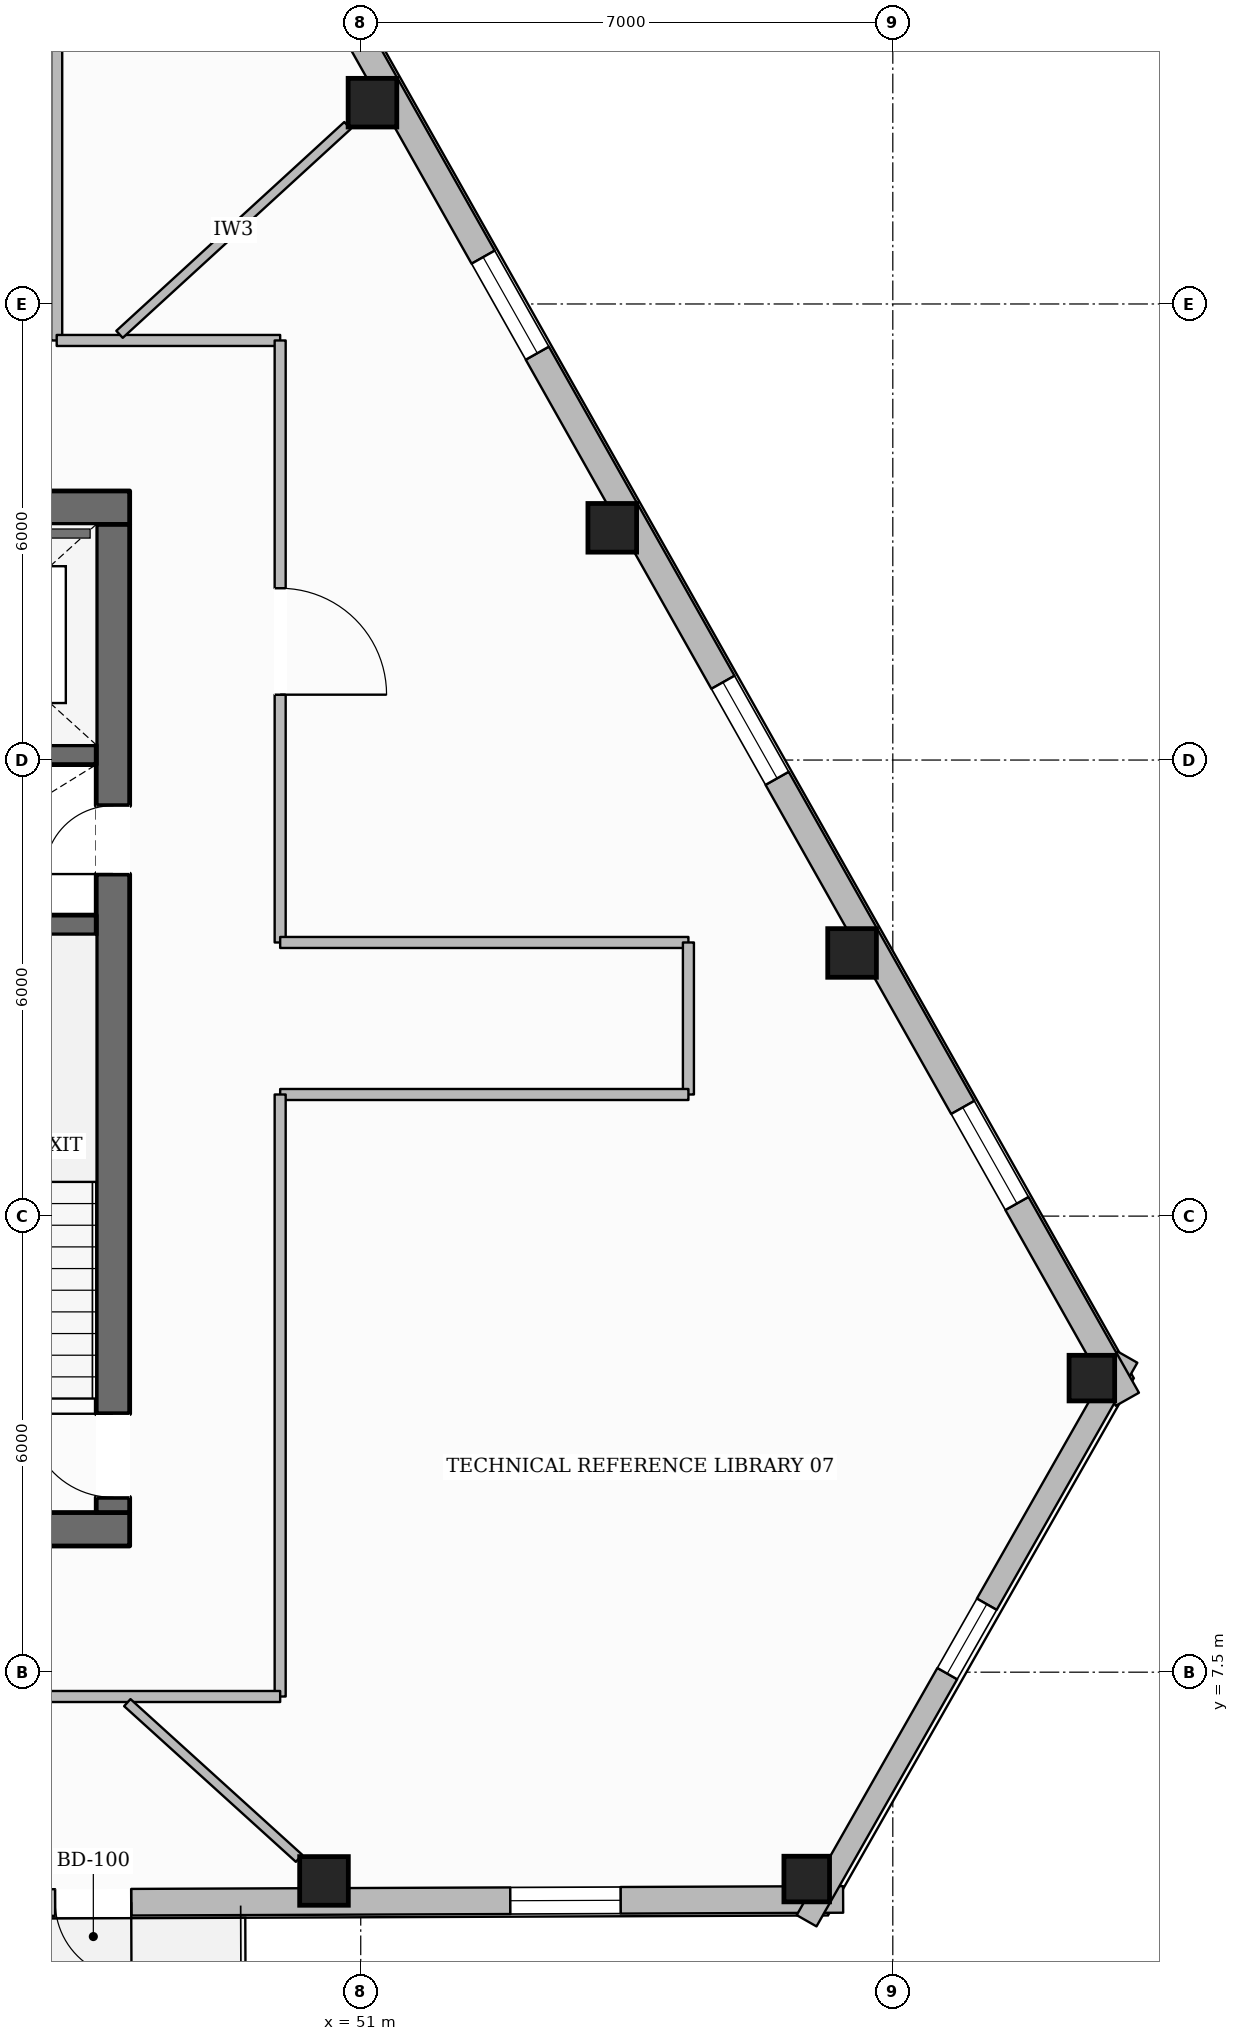
"""IFC4 building model, lengths in metres.
Left out: names, types, materials, properties, quantities, classifications, styles, units other than length and angle.
Written with IfcOpenShell. Run it as: python <this file> out.ifc"""

import sys

from ifc_helpers import new_model, si_unit, direction, frame, frame_2d, origin, origin_2d, place, context, subcontext, project, spatial, rectangle, hollow_rectangle, extrude, element, fill, save


model = new_model("IFC4")
c1 = context("Model", 3, precision=1e-05, world=origin(), true_north=direction((0.0, 1.0)))
c2 = subcontext(c1, "Body", "Model", "MODEL_VIEW")
j1 = project(units=[si_unit("LENGTHUNIT", "METRE"), si_unit("PLANEANGLEUNIT", "RADIAN")], contexts=[c1])
p1 = place(None, origin())
s1 = spatial("IfcSite", under=j1, at=p1, CompositionType="ELEMENT")
p2 = place(p1, origin())
s2 = spatial("IfcBuilding", under=s1, at=p2, CompositionType="ELEMENT")
p3 = place(p2, frame((0.0, 0.0, 230.45)))
s3 = spatial("IfcBuildingStorey", under=s2, at=p3, CompositionType="ELEMENT", Elevation=230.45)
p4 = place(p3, frame((28.04, 9.38, 0.0), z_axis=(0.0, 0.0, 1.0), x_axis=(1.0, 0.0, 0.0)))
e1 = element("IfcWall", 1, at=p4, inside=s3, PredefinedType="SOLIDWALL", context=c2, shape_type="SweptSolid", body=[
    extrude(rectangle(XDim=19.92, YDim=0.44, at=frame_2d((9.96, 0.0))), origin(), (0.0, 0.0, 1.0), 3.43),
])
p5 = place(p4, frame((10.46, 0.0, 0.0)))
e2 = element("IfcOpeningElement", 2, at=p5, cuts=e1, PredefinedType="OPENING", context=c2, shape_type="SweptSolid", body=[
    extrude(rectangle(XDim=1.4, YDim=2.2, at=frame_2d((0.7, 1.1))), frame((0.0, 0.23, 0.0), z_axis=(0.0, -1.0, 0.0), x_axis=(1.0, 0.0, 0.0)), (0.0, 0.0, 1.0), 0.46),
])
p6 = place(p3, frame((28.04, 22.82, 0.0), z_axis=(0.0, 0.0, 1.0), x_axis=(1.0, 0.0, 0.0)))
e3 = element("IfcWall", 3, at=p6, inside=s3, PredefinedType="SOLIDWALL", context=c2, shape_type="SweptSolid", body=[
    extrude(rectangle(XDim=19.92, YDim=0.44, at=frame_2d((9.96, 0.0))), origin(), (0.0, 0.0, 1.0), 3.43),
])
p7 = place(p6, frame((6.235, 0.0, 0.0)))
e4 = element("IfcOpeningElement", 4, at=p7, cuts=e3, PredefinedType="OPENING", context=c2, shape_type="SweptSolid", body=[
    extrude(rectangle(XDim=1.05, YDim=2.15, at=frame_2d((0.525, 1.075))), frame((0.0, 0.23, 0.0), z_axis=(0.0, -1.0, 0.0), x_axis=(1.0, 0.0, 0.0)), (0.0, 0.0, 1.0), 0.46),
])
p8 = place(p6, frame((12.635, 0.0, 0.0)))
e5 = element("IfcOpeningElement", 5, at=p8, cuts=e3, PredefinedType="OPENING", context=c2, shape_type="SweptSolid", body=[
    extrude(rectangle(XDim=1.05, YDim=2.15, at=frame_2d((0.525, 1.075))), frame((0.0, 0.23, 0.0), z_axis=(0.0, -1.0, 0.0), x_axis=(1.0, 0.0, 0.0)), (0.0, 0.0, 1.0), 0.46),
])
p9 = place(p3, frame((47.74, 9.6, 0.0), z_axis=(0.0, 0.0, 1.0), x_axis=(0.0, 1.0, 0.0)))
e6 = element("IfcWall", 6, at=p9, inside=s3, PredefinedType="SOLIDWALL", context=c2, shape_type="SweptSolid", body=[
    extrude(rectangle(XDim=13.0, YDim=0.44, at=frame_2d((6.5, 0.0))), origin(), (0.0, 0.0, 1.0), 3.43),
])
p10 = place(p9, frame((0.2, 0.0, 0.0)))
e7 = element("IfcOpeningElement", 7, at=p10, cuts=e6, PredefinedType="OPENING", context=c2, shape_type="SweptSolid", body=[
    extrude(rectangle(XDim=1.1, YDim=2.15, at=frame_2d((0.55, 1.075))), frame((0.0, 0.23, 0.0), z_axis=(0.0, -1.0, 0.0), x_axis=(1.0, 0.0, 0.0)), (0.0, 0.0, 1.0), 0.46),
])
p11 = place(p9, frame((8.4, 0.0, 0.0)))
e8 = element("IfcOpeningElement", 8, at=p11, cuts=e6, PredefinedType="OPENING", context=c2, shape_type="SweptSolid", body=[
    extrude(rectangle(XDim=0.9, YDim=2.1, at=frame_2d((0.45, 1.05))), frame((0.0, 0.23, 0.0), z_axis=(0.0, -1.0, 0.0), x_axis=(1.0, 0.0, 0.0)), (0.0, 0.0, 1.0), 0.46),
])
for number, where, z_axis, x_axis in (
    (9, (44.32, 17.33, 0.0), (0.0, 0.0, 1.0), (1.0, 0.0, 0.0)),
    (10, (44.32, 19.57, 0.0), (0.0, 0.0, 1.0), (1.0, 0.0, 0.0)),
):
    element("IfcWall", number, at=place(p3, frame(where, z_axis=z_axis, x_axis=x_axis)), inside=s3, PredefinedType="SHEAR", context=c2, shape_type="SweptSolid", body=[
        extrude(rectangle(XDim=3.2, YDim=0.26, at=frame_2d((1.6, 0.0))), origin(), (0.0, 0.0, 1.0), 3.43),
    ])
p12 = place(p3, frame((50.517, 4.754, 0.0), z_axis=(0.0, 0.0, 1.0), x_axis=(1.0, 0.0, 0.0)))
e11 = element("IfcColumn", 11, at=p12, inside=s3, PredefinedType="COLUMN", context=c2, shape_type="SweptSolid", body=[
    extrude(hollow_rectangle(XDim=0.64, YDim=0.64, WallThickness=0.028, at=origin_2d()), origin(), (0.0, 0.0, 1.0), 3.43),
])
for number, where, z_axis, x_axis in (
    (12, (56.867, 4.779, 0.0), (0.0, 0.0, 1.0), (1.0, 0.0, 0.0)),
    (13, (60.619, 11.369, 0.0), (0.0, 0.0, 1.0), (1.0, 0.0, 0.0)),
):
    element("IfcColumn", number, at=place(p3, frame(where, z_axis=z_axis, x_axis=x_axis)), inside=s3, PredefinedType="COLUMN", context=c2, shape_type="SweptSolid", body=[
        extrude(hollow_rectangle(XDim=0.6, YDim=0.6, WallThickness=0.028, at=origin_2d()), origin(), (0.0, 0.0, 1.0), 3.43),
    ])
for number, where, z_axis, x_axis in (
    (14, (57.464, 16.962, 0.0), (0.0, 0.0, 1.0), (1.0, 0.0, 0.0)),
    (15, (54.309, 22.555, 0.0), (0.0, 0.0, 1.0), (1.0, 0.0, 0.0)),
    (16, (51.154, 28.148, 0.0), (0.0, 0.0, 1.0), (1.0, 0.0, 0.0)),
):
    element("IfcColumn", number, at=place(p3, frame(where, z_axis=z_axis, x_axis=x_axis)), inside=s3, PredefinedType="COLUMN", context=c2, shape_type="SweptSolid", body=[
        extrude(hollow_rectangle(XDim=0.64, YDim=0.64, WallThickness=0.028, at=origin_2d()), origin(), (0.0, 0.0, 1.0), 3.43),
    ])
p13 = place(p3, frame((57.346, 4.51, 0.0), z_axis=(0.0, 0.0, 1.0), x_axis=(-0.999992347121, -0.003912249994, 0.0)))
e17 = element("IfcWall", 17, at=p13, inside=s3, PredefinedType="STANDARD", context=c2, shape_type="SweptSolid", body=[
    extrude(rectangle(XDim=39.065, YDim=0.35, at=frame_2d((19.532, 0.0))), origin(), (0.0, 0.0, 1.0), 2.962),
])
p14 = place(p13, frame((9.366, 0.0, 0.0)))
e18 = element("IfcOpeningElement", 18, at=p14, cuts=e17, PredefinedType="OPENING", context=c2, shape_type="SweptSolid", body=[
    extrude(rectangle(XDim=1.0, YDim=2.2, at=frame_2d((0.5, 1.1))), frame((0.0, 0.185, 0.0), z_axis=(0.0, -1.0, 0.0), x_axis=(1.0, 0.0, 0.0)), (0.0, 0.0, 1.0), 0.37),
])
p15 = place(p13, frame((34.683, 0.0, 0.55)))
e19 = element("IfcOpeningElement", 19, at=p15, cuts=e17, PredefinedType="OPENING", context=c2, shape_type="SweptSolid", body=[
    extrude(rectangle(XDim=1.45, YDim=1.6, at=frame_2d((0.725, 0.8))), frame((0.0, 0.185, 0.0), z_axis=(0.0, -1.0, 0.0), x_axis=(1.0, 0.0, 0.0)), (0.0, 0.0, 1.0), 0.37),
])
p16 = place(p13, frame((28.332, 0.0, 0.55)))
e20 = element("IfcOpeningElement", 20, at=p16, cuts=e17, PredefinedType="OPENING", context=c2, shape_type="SweptSolid", body=[
    extrude(rectangle(XDim=1.45, YDim=1.6, at=frame_2d((0.725, 0.8))), frame((0.0, 0.185, 0.0), z_axis=(0.0, -1.0, 0.0), x_axis=(1.0, 0.0, 0.0)), (0.0, 0.0, 1.0), 0.37),
])
p17 = place(p13, frame((21.981, 0.0, 0.55)))
e21 = element("IfcOpeningElement", 21, at=p17, cuts=e17, PredefinedType="OPENING", context=c2, shape_type="SweptSolid", body=[
    extrude(rectangle(XDim=1.45, YDim=1.6, at=frame_2d((0.725, 0.8))), frame((0.0, 0.185, 0.0), z_axis=(0.0, -1.0, 0.0), x_axis=(1.0, 0.0, 0.0)), (0.0, 0.0, 1.0), 0.37),
])
p18 = place(p13, frame((2.928, 0.0, 0.55)))
e22 = element("IfcOpeningElement", 22, at=p18, cuts=e17, PredefinedType="OPENING", context=c2, shape_type="SweptSolid", body=[
    extrude(rectangle(XDim=1.45, YDim=1.6, at=frame_2d((0.725, 0.8))), frame((0.0, 0.185, 0.0), z_axis=(0.0, -1.0, 0.0), x_axis=(1.0, 0.0, 0.0)), (0.0, 0.0, 1.0), 0.37),
])
p19 = place(p3, frame((61.087, 11.646, 0.0), z_axis=(0.0, 0.0, 1.0), x_axis=(-0.49469007423, -0.86906946239, 0.0)))
e23 = element("IfcWall", 23, at=p19, inside=s3, PredefinedType="STANDARD", context=c2, shape_type="SweptSolid", body=[
    extrude(rectangle(XDim=8.533, YDim=0.3, at=frame_2d((4.267, 0.0))), origin(), (0.0, 0.0, 1.0), 2.962),
])
p20 = place(p19, frame((3.741, 0.0, 0.65)))
e24 = element("IfcOpeningElement", 24, at=p20, cuts=e23, PredefinedType="OPENING", context=c2, shape_type="SweptSolid", body=[
    extrude(rectangle(XDim=1.05, YDim=1.55, at=frame_2d((0.525, 0.775))), frame((0.0, 0.16, 0.0), z_axis=(0.0, -1.0, 0.0), x_axis=(1.0, 0.0, 0.0)), (0.0, 0.0, 1.0), 0.32),
])
p21 = place(p3, frame((41.688, 45.48, 0.0), z_axis=(0.0, 0.0, 1.0), x_axis=(0.491295447758, -0.870992986775, 0.0)))
e25 = element("IfcWall", 25, at=p21, inside=s3, PredefinedType="STANDARD", context=c2, shape_type="SweptSolid", body=[
    extrude(rectangle(XDim=39.483, YDim=0.35, at=frame_2d((19.742, 0.0))), origin(), (0.0, 0.0, 1.0), 2.962),
])
p22 = place(p21, frame((9.471, 0.0, 0.0)))
e26 = element("IfcOpeningElement", 26, at=p22, cuts=e25, PredefinedType="OPENING", context=c2, shape_type="SweptSolid", body=[
    extrude(rectangle(XDim=1.0, YDim=2.2, at=frame_2d((0.5, 1.1))), frame((0.0, 0.185, 0.0), z_axis=(0.0, -1.0, 0.0), x_axis=(1.0, 0.0, 0.0)), (0.0, 0.0, 1.0), 0.37),
])
p23 = place(p21, frame((35.076, 0.0, 0.55)))
e27 = element("IfcOpeningElement", 27, at=p23, cuts=e25, PredefinedType="OPENING", context=c2, shape_type="SweptSolid", body=[
    extrude(rectangle(XDim=1.45, YDim=1.6, at=frame_2d((0.725, 0.8))), frame((0.0, 0.185, 0.0), z_axis=(0.0, -1.0, 0.0), x_axis=(1.0, 0.0, 0.0)), (0.0, 0.0, 1.0), 0.37),
])
p24 = place(p21, frame((28.654, 0.0, 0.55)))
e28 = element("IfcOpeningElement", 28, at=p24, cuts=e25, PredefinedType="OPENING", context=c2, shape_type="SweptSolid", body=[
    extrude(rectangle(XDim=1.45, YDim=1.6, at=frame_2d((0.725, 0.8))), frame((0.0, 0.185, 0.0), z_axis=(0.0, -1.0, 0.0), x_axis=(1.0, 0.0, 0.0)), (0.0, 0.0, 1.0), 0.37),
])
p25 = place(p21, frame((22.232, 0.0, 0.55)))
e29 = element("IfcOpeningElement", 29, at=p25, cuts=e25, PredefinedType="OPENING", context=c2, shape_type="SweptSolid", body=[
    extrude(rectangle(XDim=1.45, YDim=1.6, at=frame_2d((0.725, 0.8))), frame((0.0, 0.185, 0.0), z_axis=(0.0, -1.0, 0.0), x_axis=(1.0, 0.0, 0.0)), (0.0, 0.0, 1.0), 0.37),
])
p26 = place(p21, frame((2.967, 0.0, 0.55)))
e30 = element("IfcOpeningElement", 30, at=p26, cuts=e25, PredefinedType="OPENING", context=c2, shape_type="SweptSolid", body=[
    extrude(rectangle(XDim=1.45, YDim=1.6, at=frame_2d((0.725, 0.8))), frame((0.0, 0.185, 0.0), z_axis=(0.0, -1.0, 0.0), x_axis=(1.0, 0.0, 0.0)), (0.0, 0.0, 1.0), 0.37),
])
p27 = place(p3, frame((47.0, 33.38, 0.0), z_axis=(0.0, 0.0, 1.0), x_axis=(0.0, -1.0, 0.0)))
e31 = element("IfcWall", 31, at=p27, inside=s3, PredefinedType="PARTITIONING", context=c2, shape_type="SweptSolid", body=[
    extrude(rectangle(XDim=8.36, YDim=0.145, at=frame_2d((4.18, 0.0))), origin(), (0.0, 0.0, 1.0), 2.971),
])
p28 = place(p3, frame((47.0, 25.02, 0.0), z_axis=(0.0, 0.0, 1.0), x_axis=(1.0, 0.0, 0.0)))
e32 = element("IfcWall", 32, at=p28, inside=s3, PredefinedType="PARTITIONING", context=c2, shape_type="SweptSolid", body=[
    extrude(rectangle(XDim=2.94, YDim=0.145, at=frame_2d((1.47, 0.0))), origin(), (0.0, 0.0, 1.0), 3.43),
])
p29 = place(p3, frame((49.94, 25.02, 0.0), z_axis=(0.0, 0.0, 1.0), x_axis=(0.0, -1.0, 0.0)))
e33 = element("IfcWall", 33, at=p29, inside=s3, PredefinedType="PARTITIONING", context=c2, shape_type="SweptSolid", body=[
    extrude(rectangle(XDim=7.92, YDim=0.145, at=frame_2d((3.96, 0.0))), origin(), (0.0, 0.0, 1.0), 3.169),
])
p30 = place(p29, frame((3.26, 0.0, 0.0)))
e34 = element("IfcOpeningElement", 34, at=p30, cuts=e33, PredefinedType="OPENING", context=c2, shape_type="SweptSolid", body=[
    extrude(rectangle(XDim=1.4, YDim=2.2, at=frame_2d((0.7, 1.1))), frame((0.0, 0.083, 0.0), z_axis=(0.0, -1.0, 0.0), x_axis=(1.0, 0.0, 0.0)), (0.0, 0.0, 1.0), 0.165),
])
p31 = place(p3, frame((49.94, 17.1, 0.0), z_axis=(0.0, 0.0, 1.0), x_axis=(1.0, 0.0, 0.0)))
e35 = element("IfcWall", 35, at=p31, inside=s3, PredefinedType="PARTITIONING", context=c2, shape_type="SweptSolid", body=[
    extrude(rectangle(XDim=5.371, YDim=0.145, at=frame_2d((2.686, 0.0))), origin(), (0.0, 0.0, 1.0), 2.971),
])
p32 = place(p3, frame((55.311, 17.1, 0.0), z_axis=(0.0, 0.0, 1.0), x_axis=(0.0, -1.0, 0.0)))
e36 = element("IfcWall", 36, at=p32, inside=s3, PredefinedType="PARTITIONING", context=c2, shape_type="SweptSolid", body=[
    extrude(rectangle(XDim=2.0, YDim=0.145, at=frame_2d((1.0, 0.0))), origin(), (0.0, 0.0, 1.0), 3.169),
])
p33 = place(p3, frame((55.311, 15.1, 0.0), z_axis=(0.0, 0.0, 1.0), x_axis=(-1.0, 0.0, 0.0)))
e37 = element("IfcWall", 37, at=p33, inside=s3, PredefinedType="PARTITIONING", context=c2, shape_type="SweptSolid", body=[
    extrude(rectangle(XDim=5.371, YDim=0.145, at=frame_2d((2.686, 0.0))), origin(), (0.0, 0.0, 1.0), 3.43),
])
p34 = place(p3, frame((49.94, 15.1, 0.0), z_axis=(0.0, 0.0, 1.0), x_axis=(0.0, -1.0, 0.0)))
e38 = element("IfcWall", 38, at=p34, inside=s3, PredefinedType="PARTITIONING", context=c2, shape_type="SweptSolid", body=[
    extrude(rectangle(XDim=7.92, YDim=0.145, at=frame_2d((3.96, 0.0))), origin(), (0.0, 0.0, 1.0), 3.43),
])
p35 = place(p3, frame((49.94, 7.18, 0.0), z_axis=(0.0, 0.0, 1.0), x_axis=(-1.0, 0.0, 0.0)))
e39 = element("IfcWall", 39, at=p35, inside=s3, PredefinedType="PARTITIONING", context=c2, shape_type="SweptSolid", body=[
    extrude(rectangle(XDim=23.88, YDim=0.145, at=frame_2d((11.94, 0.0))), origin(), (0.0, 0.0, 1.0), 3.169),
])
p36 = place(p35, frame((18.5, 0.0, 0.0)))
e40 = element("IfcOpeningElement", 40, at=p36, cuts=e39, PredefinedType="OPENING", context=c2, shape_type="SweptSolid", body=[
    extrude(rectangle(XDim=0.88, YDim=2.1, at=frame_2d((0.44, 1.05))), frame((0.0, 0.083, 0.0), z_axis=(0.0, -1.0, 0.0), x_axis=(1.0, 0.0, 0.0)), (0.0, 0.0, 1.0), 0.165),
])
p37 = place(p35, frame((15.98, 0.0, 0.0)))
e41 = element("IfcOpeningElement", 41, at=p37, cuts=e39, PredefinedType="OPENING", context=c2, shape_type="SweptSolid", body=[
    extrude(rectangle(XDim=0.88, YDim=2.1, at=frame_2d((0.44, 1.05))), frame((0.0, 0.083, 0.0), z_axis=(0.0, -1.0, 0.0), x_axis=(1.0, 0.0, 0.0)), (0.0, 0.0, 1.0), 0.165),
])
p38 = place(p35, frame((13.52, 0.0, 0.0)))
e42 = element("IfcOpeningElement", 42, at=p38, cuts=e39, PredefinedType="OPENING", context=c2, shape_type="SweptSolid", body=[
    extrude(rectangle(XDim=0.96, YDim=2.1, at=frame_2d((0.48, 1.05))), frame((0.0, 0.083, 0.0), z_axis=(0.0, -1.0, 0.0), x_axis=(1.0, 0.0, 0.0)), (0.0, 0.0, 1.0), 0.165),
])
p39 = place(p35, frame((21.459, 0.0, 0.0)))
e43 = element("IfcOpeningElement", 43, at=p39, cuts=e39, PredefinedType="OPENING", context=c2, shape_type="SweptSolid", body=[
    extrude(rectangle(XDim=0.98, YDim=2.15, at=frame_2d((0.49, 1.075))), frame((0.0, 0.083, 0.0), z_axis=(0.0, -1.0, 0.0), x_axis=(1.0, 0.0, 0.0)), (0.0, 0.0, 1.0), 0.165),
])
p40 = place(p35, frame((6.99, 0.0, 0.0)))
e44 = element("IfcOpeningElement", 44, at=p40, cuts=e39, PredefinedType="OPENING", context=c2, shape_type="SweptSolid", body=[
    extrude(rectangle(XDim=0.98, YDim=2.15, at=frame_2d((0.49, 1.075))), frame((0.0, 0.083, 0.0), z_axis=(0.0, -1.0, 0.0), x_axis=(1.0, 0.0, 0.0)), (0.0, 0.0, 1.0), 0.165),
])
p41 = place(p3, frame((47.826, 25.101, 0.0), z_axis=(0.0, 0.0, 1.0), x_axis=(0.737455521612, 0.67539570153, 0.0)))
e45 = element("IfcWall", 45, at=p41, inside=s3, PredefinedType="PARTITIONING", context=c2, shape_type="SweptSolid", body=[
    extrude(rectangle(XDim=4.068, YDim=0.125, at=frame_2d((2.034, 0.0))), origin(), (0.0, 0.0, 1.0), 3.43),
])
p42 = place(p3, frame((47.929, 7.1, 0.0), z_axis=(0.0, 0.0, 1.0), x_axis=(0.740877413659, -0.671640274202, 0.0)))
e46 = element("IfcWall", 46, at=p42, inside=s3, PredefinedType="PARTITIONING", context=c2, shape_type="SweptSolid", body=[
    extrude(rectangle(XDim=3.05, YDim=0.125, at=frame_2d((1.525, 0.0))), origin(), (0.0, 0.0, 1.0), 3.43),
])
p43 = place(p14, origin())
e47 = element("IfcDoor", 47, at=p43, inside=s3, OperationType="SINGLE_SWING_LEFT", PredefinedType="DOOR", context=c2, shape_type="SweptSolid", body=[
    extrude(rectangle(XDim=1.0, YDim=2.2, at=frame_2d((0.5, 1.1))), frame((0.0, 0.025, 0.0), z_axis=(0.0, -1.0, 0.0), x_axis=(1.0, 0.0, 0.0)), (0.0, 0.0, 1.0), 0.05),
])
fill(e18, e47)
p44 = place(p18, origin())
e48 = element("IfcWindow", 48, at=p44, inside=s3, PartitioningType="SINGLE_PANEL", PredefinedType="WINDOW", context=c2, shape_type="SweptSolid", body=[
    extrude(rectangle(XDim=1.45, YDim=1.6, at=frame_2d((0.725, 0.8))), frame((0.0, 0.03, 0.0), z_axis=(0.0, -1.0, 0.0), x_axis=(1.0, 0.0, 0.0)), (0.0, 0.0, 1.0), 0.06),
])
fill(e22, e48)
p45 = place(p23, origin())
e49 = element("IfcWindow", 49, at=p45, inside=s3, PartitioningType="SINGLE_PANEL", PredefinedType="WINDOW", context=c2, shape_type="SweptSolid", body=[
    extrude(rectangle(XDim=1.45, YDim=1.6, at=frame_2d((0.725, 0.8))), frame((0.0, 0.03, 0.0), z_axis=(0.0, -1.0, 0.0), x_axis=(1.0, 0.0, 0.0)), (0.0, 0.0, 1.0), 0.06),
])
fill(e27, e49)
p46 = place(p24, origin())
e50 = element("IfcWindow", 50, at=p46, inside=s3, PartitioningType="SINGLE_PANEL", PredefinedType="WINDOW", context=c2, shape_type="SweptSolid", body=[
    extrude(rectangle(XDim=1.45, YDim=1.6, at=frame_2d((0.725, 0.8))), frame((0.0, 0.03, 0.0), z_axis=(0.0, -1.0, 0.0), x_axis=(1.0, 0.0, 0.0)), (0.0, 0.0, 1.0), 0.06),
])
fill(e28, e50)
p47 = place(p25, origin())
e51 = element("IfcWindow", 51, at=p47, inside=s3, PartitioningType="SINGLE_PANEL", PredefinedType="WINDOW", context=c2, shape_type="SweptSolid", body=[
    extrude(rectangle(XDim=1.45, YDim=1.6, at=frame_2d((0.725, 0.8))), frame((0.0, 0.03, 0.0), z_axis=(0.0, -1.0, 0.0), x_axis=(1.0, 0.0, 0.0)), (0.0, 0.0, 1.0), 0.06),
])
fill(e29, e51)
p48 = place(p20, origin())
e52 = element("IfcWindow", 52, at=p48, inside=s3, PartitioningType="SINGLE_PANEL", PredefinedType="WINDOW", context=c2, shape_type="SweptSolid", body=[
    extrude(rectangle(XDim=1.05, YDim=1.55, at=frame_2d((0.525, 0.775))), frame((0.0, 0.03, 0.0), z_axis=(0.0, -1.0, 0.0), x_axis=(1.0, 0.0, 0.0)), (0.0, 0.0, 1.0), 0.06),
])
fill(e24, e52)
p49 = place(p10, origin())
e53 = element("IfcDoor", 53, at=p49, inside=s3, OperationType="SINGLE_SWING_RIGHT", PredefinedType="DOOR", context=c2, shape_type="SweptSolid", body=[
    extrude(rectangle(XDim=1.1, YDim=2.15, at=frame_2d((0.55, 1.075))), frame((0.0, 0.025, 0.0), z_axis=(0.0, -1.0, 0.0), x_axis=(1.0, 0.0, 0.0)), (0.0, 0.0, 1.0), 0.05),
])
fill(e7, e53)
p50 = place(p11, origin())
e54 = element("IfcDoor", 54, at=p50, inside=s3, OperationType="SINGLE_SWING_LEFT", PredefinedType="DOOR", context=c2, shape_type="SweptSolid", body=[
    extrude(rectangle(XDim=0.9, YDim=2.1, at=frame_2d((0.45, 1.05))), frame((0.0, 0.025, 0.0), z_axis=(0.0, -1.0, 0.0), x_axis=(1.0, 0.0, 0.0)), (0.0, 0.0, 1.0), 0.05),
])
fill(e8, e54)
p51 = place(p30, origin())
e55 = element("IfcDoor", 55, at=p51, inside=s3, OperationType="SINGLE_SWING_RIGHT", PredefinedType="DOOR", context=c2, shape_type="SweptSolid", body=[
    extrude(rectangle(XDim=1.4, YDim=2.2, at=frame_2d((0.7, 1.1))), frame((0.0, 0.025, 0.0), z_axis=(0.0, -1.0, 0.0), x_axis=(1.0, 0.0, 0.0)), (0.0, 0.0, 1.0), 0.05),
])
fill(e34, e55)
save(model, sys.argv[1])
